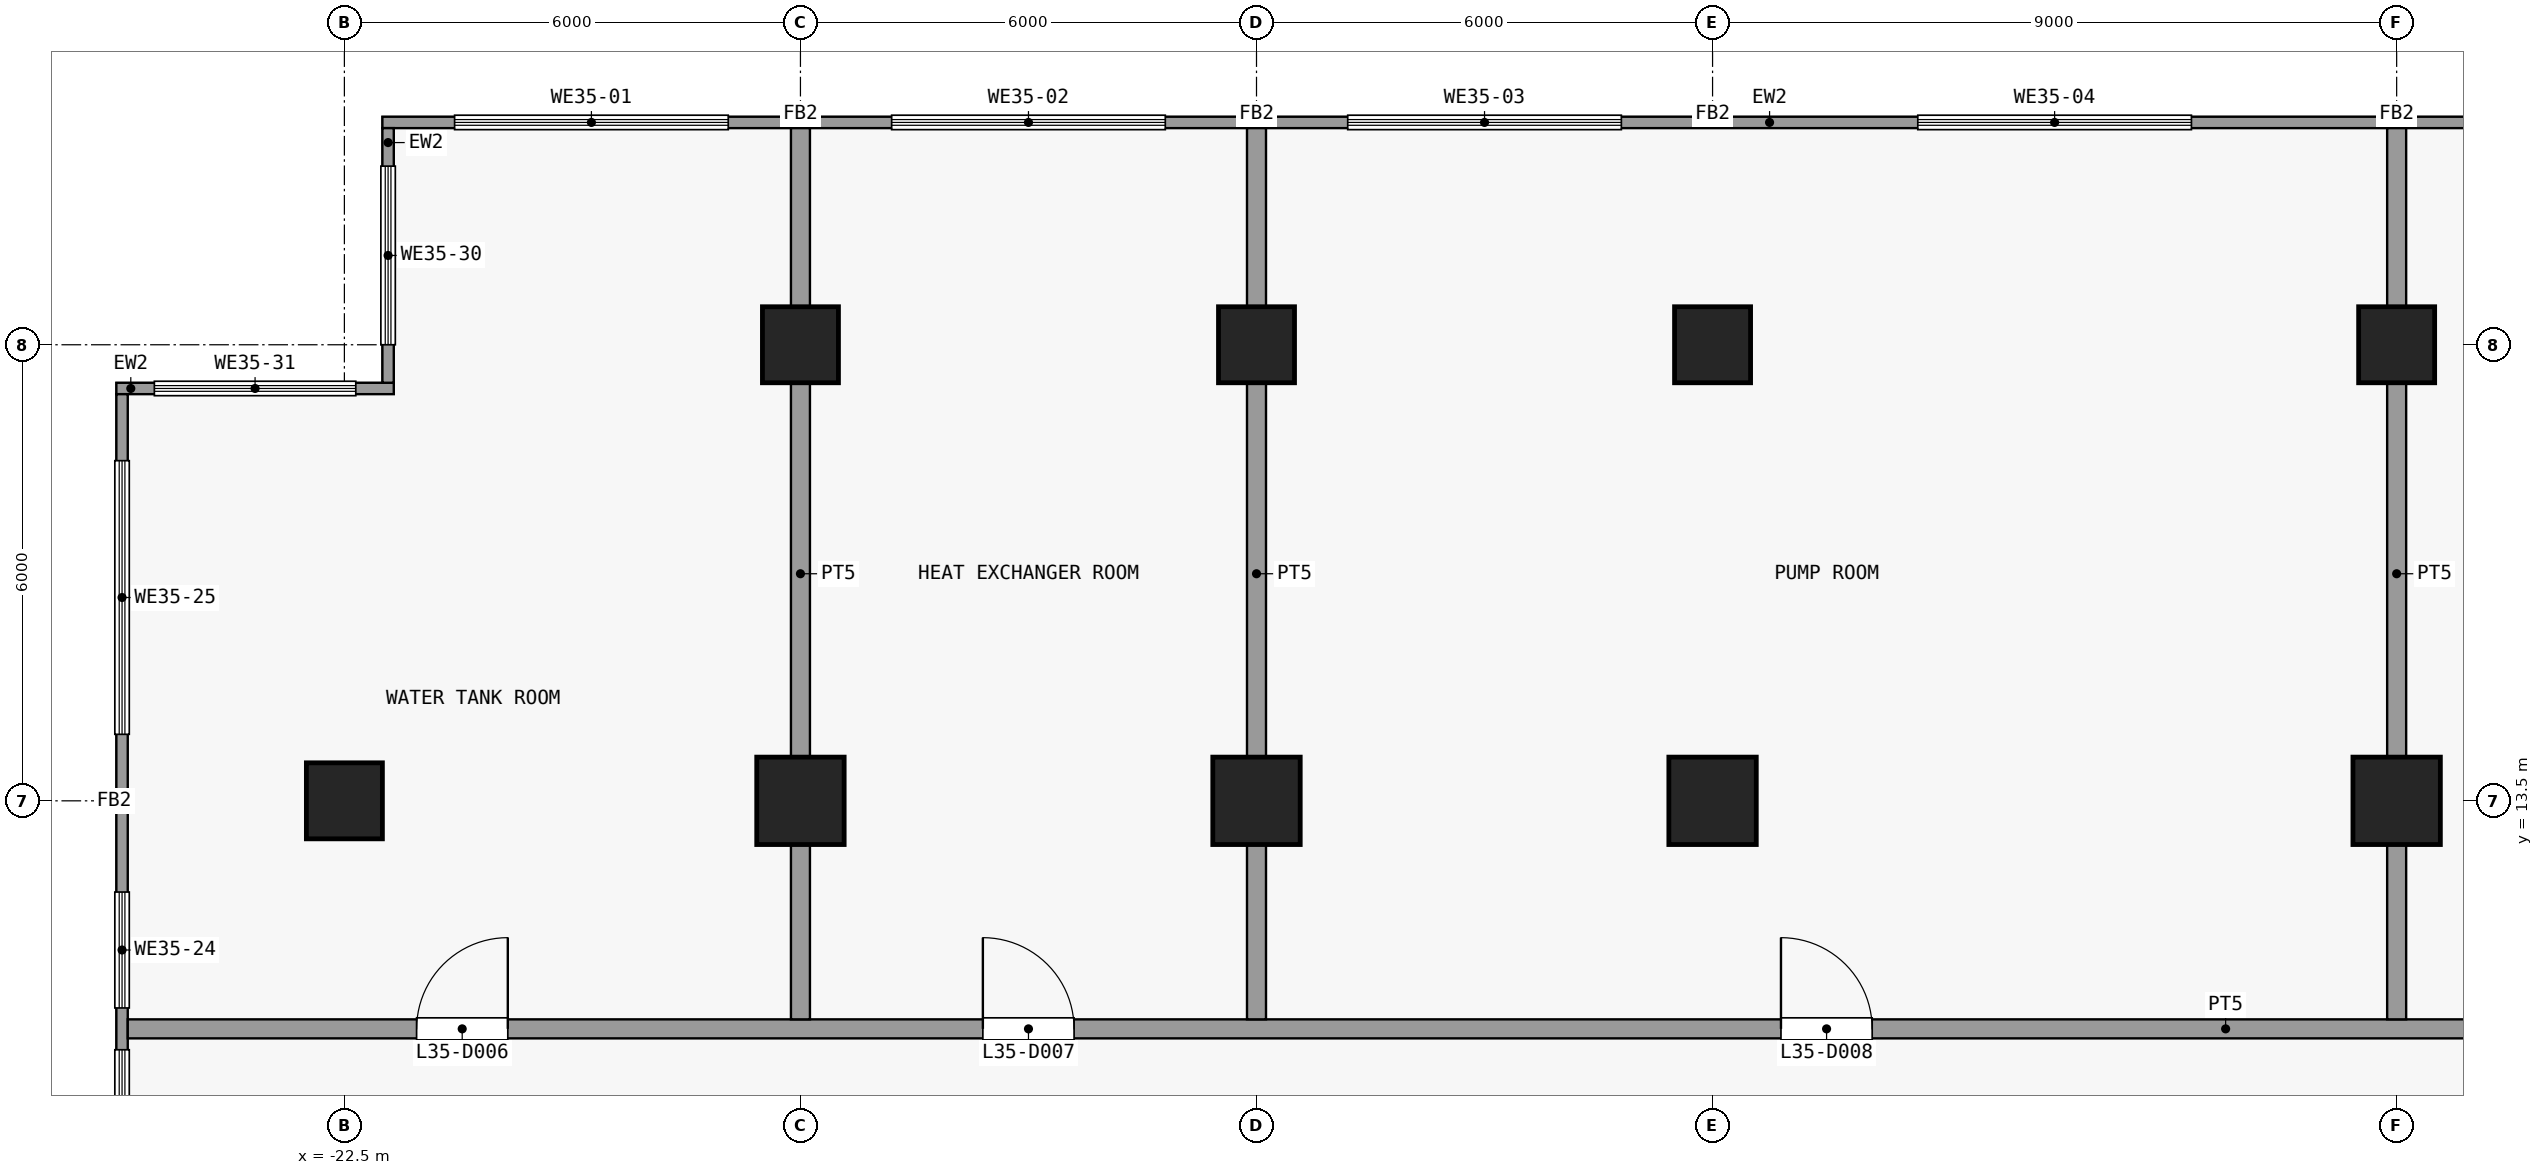
"""IFC4 building model, lengths in metres.
Left out: names, types, materials, properties, quantities, classifications, styles, units other than length and angle.
Written with IfcOpenShell. Run it as: python <this file> out.ifc"""

import sys

from ifc_helpers import new_model, si_unit, direction, frame, frame_2d, origin, origin_2d, place, context, subcontext, project, spatial, rectangle, extrude, element, fill, save


model = new_model("IFC4")
c1 = context("Model", 3, precision=1e-05, world=origin(), true_north=direction((0.0, 1.0)))
c2 = subcontext(c1, "Body", "Model", "MODEL_VIEW")
j1 = project(units=[si_unit("LENGTHUNIT", "METRE"), si_unit("PLANEANGLEUNIT", "RADIAN")], contexts=[c1])
p1 = place(None, origin())
s1 = spatial("IfcSite", under=j1, at=p1, CompositionType="ELEMENT")
p2 = place(p1, origin())
s2 = spatial("IfcBuilding", under=s1, at=p2, CompositionType="ELEMENT")
p3 = place(p2, frame((0.0, 0.0, 143.9)))
s3 = spatial("IfcBuildingStorey", under=s2, at=p3, CompositionType="ELEMENT", Elevation=143.9)
p4 = place(p3, frame((-22.5, 13.5, 0.0), z_axis=(0.0, 0.0, 1.0), x_axis=(1.0, 0.0, 0.0)))
e1 = element("IfcColumn", 1, at=p4, inside=s3, PredefinedType="COLUMN", context=c2, shape_type="SweptSolid", body=[
    extrude(rectangle(XDim=1.0, YDim=1.0, at=origin_2d()), origin(), (0.0, 0.0, 1.0), 5.4),
])
p5 = place(p3, frame((-16.5, 13.5, 0.0), z_axis=(0.0, 0.0, 1.0), x_axis=(1.0, 0.0, 0.0)))
e2 = element("IfcColumn", 2, at=p5, inside=s3, PredefinedType="COLUMN", context=c2, shape_type="SweptSolid", body=[
    extrude(rectangle(XDim=1.15, YDim=1.15, at=origin_2d()), origin(), (0.0, 0.0, 1.0), 5.4),
])
p6 = place(p3, frame((-16.5, 19.5, 0.0), z_axis=(0.0, 0.0, 1.0), x_axis=(1.0, 0.0, 0.0)))
e3 = element("IfcColumn", 3, at=p6, inside=s3, PredefinedType="COLUMN", context=c2, shape_type="SweptSolid", body=[
    extrude(rectangle(XDim=1.0, YDim=1.0, at=origin_2d()), origin(), (0.0, 0.0, 1.0), 5.4),
])
p7 = place(p3, frame((-10.5, 13.5, 0.0), z_axis=(0.0, 0.0, 1.0), x_axis=(1.0, 0.0, 0.0)))
e4 = element("IfcColumn", 4, at=p7, inside=s3, PredefinedType="COLUMN", context=c2, shape_type="SweptSolid", body=[
    extrude(rectangle(XDim=1.15, YDim=1.15, at=origin_2d()), origin(), (0.0, 0.0, 1.0), 5.4),
])
p8 = place(p3, frame((-10.5, 19.5, 0.0), z_axis=(0.0, 0.0, 1.0), x_axis=(1.0, 0.0, 0.0)))
e5 = element("IfcColumn", 5, at=p8, inside=s3, PredefinedType="COLUMN", context=c2, shape_type="SweptSolid", body=[
    extrude(rectangle(XDim=1.0, YDim=1.0, at=origin_2d()), origin(), (0.0, 0.0, 1.0), 5.4),
])
p9 = place(p3, frame((-4.5, 13.5, 0.0), z_axis=(0.0, 0.0, 1.0), x_axis=(1.0, 0.0, 0.0)))
e6 = element("IfcColumn", 6, at=p9, inside=s3, PredefinedType="COLUMN", context=c2, shape_type="SweptSolid", body=[
    extrude(rectangle(XDim=1.15, YDim=1.15, at=origin_2d()), origin(), (0.0, 0.0, 1.0), 5.4),
])
p10 = place(p3, frame((-4.5, 19.5, 0.0), z_axis=(0.0, 0.0, 1.0), x_axis=(1.0, 0.0, 0.0)))
e7 = element("IfcColumn", 7, at=p10, inside=s3, PredefinedType="COLUMN", context=c2, shape_type="SweptSolid", body=[
    extrude(rectangle(XDim=1.0, YDim=1.0, at=origin_2d()), origin(), (0.0, 0.0, 1.0), 5.4),
])
p11 = place(p3, frame((4.5, 13.5, 0.0), z_axis=(0.0, 0.0, 1.0), x_axis=(1.0, 0.0, 0.0)))
e8 = element("IfcColumn", 8, at=p11, inside=s3, PredefinedType="COLUMN", context=c2, shape_type="SweptSolid", body=[
    extrude(rectangle(XDim=1.15, YDim=1.15, at=origin_2d()), origin(), (0.0, 0.0, 1.0), 5.4),
])
p12 = place(p3, frame((4.5, 19.5, 0.0), z_axis=(0.0, 0.0, 1.0), x_axis=(1.0, 0.0, 0.0)))
e9 = element("IfcColumn", 9, at=p12, inside=s3, PredefinedType="COLUMN", context=c2, shape_type="SweptSolid", body=[
    extrude(rectangle(XDim=1.0, YDim=1.0, at=origin_2d()), origin(), (0.0, 0.0, 1.0), 5.4),
])
p13 = place(p3, frame((-22.0, 22.425, 0.0), z_axis=(0.0, 0.0, 1.0), x_axis=(1.0, 0.0, 0.0)))
e10 = element("IfcWall", 10, at=p13, inside=s3, PredefinedType="SOLIDWALL", context=c2, shape_type="SweptSolid", body=[
    extrude(rectangle(XDim=44.0, YDim=0.15, at=frame_2d((22.0, 0.0))), origin(), (0.0, 0.0, 1.0), 5.0),
])
p14 = place(p13, frame((0.95, 0.0, 1.2)))
e11 = element("IfcOpeningElement", 11, at=p14, cuts=e10, PredefinedType="OPENING", context=c2, shape_type="SweptSolid", body=[
    extrude(rectangle(XDim=3.6, YDim=3.0, at=frame_2d((1.8, 1.5))), frame((0.0, 0.085, 0.0), z_axis=(0.0, -1.0, 0.0), x_axis=(1.0, 0.0, 0.0)), (0.0, 0.0, 1.0), 0.17),
])
p15 = place(p13, frame((6.7, 0.0, 1.2)))
e12 = element("IfcOpeningElement", 12, at=p15, cuts=e10, PredefinedType="OPENING", context=c2, shape_type="SweptSolid", body=[
    extrude(rectangle(XDim=3.6, YDim=3.0, at=frame_2d((1.8, 1.5))), frame((0.0, 0.085, 0.0), z_axis=(0.0, -1.0, 0.0), x_axis=(1.0, 0.0, 0.0)), (0.0, 0.0, 1.0), 0.17),
])
p16 = place(p13, frame((12.7, 0.0, 1.2)))
e13 = element("IfcOpeningElement", 13, at=p16, cuts=e10, PredefinedType="OPENING", context=c2, shape_type="SweptSolid", body=[
    extrude(rectangle(XDim=3.6, YDim=3.0, at=frame_2d((1.8, 1.5))), frame((0.0, 0.085, 0.0), z_axis=(0.0, -1.0, 0.0), x_axis=(1.0, 0.0, 0.0)), (0.0, 0.0, 1.0), 0.17),
])
p17 = place(p13, frame((20.2, 0.0, 1.2)))
e14 = element("IfcOpeningElement", 14, at=p17, cuts=e10, PredefinedType="OPENING", context=c2, shape_type="SweptSolid", body=[
    extrude(rectangle(XDim=3.6, YDim=3.0, at=frame_2d((1.8, 1.5))), frame((0.0, 0.085, 0.0), z_axis=(0.0, -1.0, 0.0), x_axis=(1.0, 0.0, 0.0)), (0.0, 0.0, 1.0), 0.17),
])
p18 = place(p13, frame((27.7, 0.0, 1.2)))
e15 = element("IfcOpeningElement", 15, at=p18, cuts=e10, PredefinedType="OPENING", context=c2, shape_type="SweptSolid", body=[
    extrude(rectangle(XDim=3.6, YDim=3.0, at=frame_2d((1.8, 1.5))), frame((0.0, 0.085, 0.0), z_axis=(0.0, -1.0, 0.0), x_axis=(1.0, 0.0, 0.0)), (0.0, 0.0, 1.0), 0.17),
])
p19 = place(p13, frame((33.7, 0.0, 1.2)))
e16 = element("IfcOpeningElement", 16, at=p19, cuts=e10, PredefinedType="OPENING", context=c2, shape_type="SweptSolid", body=[
    extrude(rectangle(XDim=3.6, YDim=3.0, at=frame_2d((1.8, 1.5))), frame((0.0, 0.085, 0.0), z_axis=(0.0, -1.0, 0.0), x_axis=(1.0, 0.0, 0.0)), (0.0, 0.0, 1.0), 0.17),
])
p20 = place(p13, frame((39.45, 0.0, 1.2)))
e17 = element("IfcOpeningElement", 17, at=p20, cuts=e10, PredefinedType="OPENING", context=c2, shape_type="SweptSolid", body=[
    extrude(rectangle(XDim=3.6, YDim=3.0, at=frame_2d((1.8, 1.5))), frame((0.0, 0.085, 0.0), z_axis=(0.0, -1.0, 0.0), x_axis=(1.0, 0.0, 0.0)), (0.0, 0.0, 1.0), 0.17),
])
p21 = place(p3, frame((-25.425, -21.85, 0.0), z_axis=(0.0, 0.0, 1.0), x_axis=(0.0, 1.0, 0.0)))
e18 = element("IfcWall", 18, at=p21, inside=s3, PredefinedType="SOLIDWALL", context=c2, shape_type="SweptSolid", body=[
    extrude(rectangle(XDim=40.7, YDim=0.15, at=frame_2d((20.35, 0.0))), origin(), (0.0, 0.0, 1.0), 5.0),
])
p22 = place(p21, frame((2.375, 0.0, 1.2)))
e19 = element("IfcOpeningElement", 19, at=p22, cuts=e18, PredefinedType="OPENING", context=c2, shape_type="SweptSolid", body=[
    extrude(rectangle(XDim=3.6, YDim=3.0, at=frame_2d((1.8, 1.5))), frame((0.0, 0.085, 0.0), z_axis=(0.0, -1.0, 0.0), x_axis=(1.0, 0.0, 0.0)), (0.0, 0.0, 1.0), 0.17),
])
p23 = place(p21, frame((11.05, 0.0, 1.2)))
e20 = element("IfcOpeningElement", 20, at=p23, cuts=e18, PredefinedType="OPENING", context=c2, shape_type="SweptSolid", body=[
    extrude(rectangle(XDim=2.625, YDim=3.0, at=frame_2d((1.312, 1.5))), frame((0.0, 0.085, 0.0), z_axis=(0.0, -1.0, 0.0), x_axis=(1.0, 0.0, 0.0)), (0.0, 0.0, 1.0), 0.17),
])
p24 = place(p21, frame((18.55, 0.0, 1.2)))
e21 = element("IfcOpeningElement", 21, at=p24, cuts=e18, PredefinedType="OPENING", context=c2, shape_type="SweptSolid", body=[
    extrude(rectangle(XDim=3.6, YDim=3.0, at=frame_2d((1.8, 1.5))), frame((0.0, 0.085, 0.0), z_axis=(0.0, -1.0, 0.0), x_axis=(1.0, 0.0, 0.0)), (0.0, 0.0, 1.0), 0.17),
])
p25 = place(p21, frame((24.55, 0.0, 1.2)))
e22 = element("IfcOpeningElement", 22, at=p25, cuts=e18, PredefinedType="OPENING", context=c2, shape_type="SweptSolid", body=[
    extrude(rectangle(XDim=3.6, YDim=3.0, at=frame_2d((1.8, 1.5))), frame((0.0, 0.085, 0.0), z_axis=(0.0, -1.0, 0.0), x_axis=(1.0, 0.0, 0.0)), (0.0, 0.0, 1.0), 0.17),
])
p26 = place(p21, frame((30.55, 0.0, 1.2)))
e23 = element("IfcOpeningElement", 23, at=p26, cuts=e18, PredefinedType="OPENING", context=c2, shape_type="SweptSolid", body=[
    extrude(rectangle(XDim=1.525, YDim=3.0, at=frame_2d((0.762, 1.5))), frame((0.0, 0.085, 0.0), z_axis=(0.0, -1.0, 0.0), x_axis=(1.0, 0.0, 0.0)), (0.0, 0.0, 1.0), 0.17),
])
p27 = place(p21, frame((32.625, 0.0, 1.2)))
e24 = element("IfcOpeningElement", 24, at=p27, cuts=e18, PredefinedType="OPENING", context=c2, shape_type="SweptSolid", body=[
    extrude(rectangle(XDim=1.525, YDim=3.0, at=frame_2d((0.762, 1.5))), frame((0.0, 0.085, 0.0), z_axis=(0.0, -1.0, 0.0), x_axis=(1.0, 0.0, 0.0)), (0.0, 0.0, 1.0), 0.17),
])
p28 = place(p21, frame((36.225, 0.0, 1.2)))
e25 = element("IfcOpeningElement", 25, at=p28, cuts=e18, PredefinedType="OPENING", context=c2, shape_type="SweptSolid", body=[
    extrude(rectangle(XDim=3.6, YDim=3.0, at=frame_2d((1.8, 1.5))), frame((0.0, 0.085, 0.0), z_axis=(0.0, -1.0, 0.0), x_axis=(1.0, 0.0, 0.0)), (0.0, 0.0, 1.0), 0.17),
])
p29 = place(p3, frame((-21.925, 19.0, 0.0), z_axis=(0.0, 0.0, 1.0), x_axis=(0.0, 1.0, 0.0)))
e26 = element("IfcWall", 26, at=p29, inside=s3, PredefinedType="SOLIDWALL", context=c2, shape_type="SweptSolid", body=[
    extrude(rectangle(XDim=3.35, YDim=0.15, at=frame_2d((1.675, 0.0))), origin(), (0.0, 0.0, 1.0), 5.0),
])
p30 = place(p29, frame((0.5, 0.0, 1.2)))
e27 = element("IfcOpeningElement", 27, at=p30, cuts=e26, PredefinedType="OPENING", context=c2, shape_type="SweptSolid", body=[
    extrude(rectangle(XDim=2.35, YDim=3.0, at=frame_2d((1.175, 1.5))), frame((0.0, 0.085, 0.0), z_axis=(0.0, -1.0, 0.0), x_axis=(1.0, 0.0, 0.0)), (0.0, 0.0, 1.0), 0.17),
])
p31 = place(p3, frame((-25.5, 18.925, 0.0), z_axis=(0.0, 0.0, 1.0), x_axis=(1.0, 0.0, 0.0)))
e28 = element("IfcWall", 28, at=p31, inside=s3, PredefinedType="SOLIDWALL", context=c2, shape_type="SweptSolid", body=[
    extrude(rectangle(XDim=3.65, YDim=0.15, at=frame_2d((1.825, 0.0))), origin(), (0.0, 0.0, 1.0), 5.0),
])
p32 = place(p31, frame((0.5, 0.0, 1.2)))
e29 = element("IfcOpeningElement", 29, at=p32, cuts=e28, PredefinedType="OPENING", context=c2, shape_type="SweptSolid", body=[
    extrude(rectangle(XDim=2.65, YDim=3.0, at=frame_2d((1.325, 1.5))), frame((0.0, 0.085, 0.0), z_axis=(0.0, -1.0, 0.0), x_axis=(1.0, 0.0, 0.0)), (0.0, 0.0, 1.0), 0.17),
])
p33 = place(p3, frame((-25.35, 10.5, 0.0), z_axis=(0.0, 0.0, 1.0), x_axis=(1.0, 0.0, 0.0)))
e30 = element("IfcWall", 30, at=p33, inside=s3, PredefinedType="PARTITIONING", context=c2, shape_type="SweptSolid", body=[
    extrude(rectangle(XDim=50.7, YDim=0.25, at=frame_2d((25.35, 0.0))), origin(), (0.0, 0.0, 1.0), 5.0),
])
p34 = place(p33, frame((3.8, 0.0, 0.0)))
e31 = element("IfcOpeningElement", 31, at=p34, cuts=e30, PredefinedType="OPENING", context=c2, shape_type="SweptSolid", body=[
    extrude(rectangle(XDim=1.2, YDim=2.1, at=frame_2d((0.6, 1.05))), frame((0.0, 0.135, 0.0), z_axis=(0.0, -1.0, 0.0), x_axis=(1.0, 0.0, 0.0)), (0.0, 0.0, 1.0), 0.27),
])
p35 = place(p33, frame((11.25, 0.0, 0.0)))
e32 = element("IfcOpeningElement", 32, at=p35, cuts=e30, PredefinedType="OPENING", context=c2, shape_type="SweptSolid", body=[
    extrude(rectangle(XDim=1.2, YDim=2.1, at=frame_2d((0.6, 1.05))), frame((0.0, 0.135, 0.0), z_axis=(0.0, -1.0, 0.0), x_axis=(1.0, 0.0, 0.0)), (0.0, 0.0, 1.0), 0.27),
])
p36 = place(p33, frame((21.75, 0.0, 0.0)))
e33 = element("IfcOpeningElement", 33, at=p36, cuts=e30, PredefinedType="OPENING", context=c2, shape_type="SweptSolid", body=[
    extrude(rectangle(XDim=1.2, YDim=2.1, at=frame_2d((0.6, 1.05))), frame((0.0, 0.135, 0.0), z_axis=(0.0, -1.0, 0.0), x_axis=(1.0, 0.0, 0.0)), (0.0, 0.0, 1.0), 0.27),
])
p37 = place(p33, frame((32.25, 0.0, 0.0)))
e34 = element("IfcOpeningElement", 34, at=p37, cuts=e30, PredefinedType="OPENING", context=c2, shape_type="SweptSolid", body=[
    extrude(rectangle(XDim=1.2, YDim=2.1, at=frame_2d((0.6, 1.05))), frame((0.0, 0.135, 0.0), z_axis=(0.0, -1.0, 0.0), x_axis=(1.0, 0.0, 0.0)), (0.0, 0.0, 1.0), 0.27),
])
p38 = place(p33, frame((38.25, 0.0, 0.0)))
e35 = element("IfcOpeningElement", 35, at=p38, cuts=e30, PredefinedType="OPENING", context=c2, shape_type="SweptSolid", body=[
    extrude(rectangle(XDim=1.2, YDim=2.1, at=frame_2d((0.6, 1.05))), frame((0.0, 0.135, 0.0), z_axis=(0.0, -1.0, 0.0), x_axis=(1.0, 0.0, 0.0)), (0.0, 0.0, 1.0), 0.27),
])
p39 = place(p33, frame((45.65, 0.0, 0.0)))
e36 = element("IfcOpeningElement", 36, at=p39, cuts=e30, PredefinedType="OPENING", context=c2, shape_type="SweptSolid", body=[
    extrude(rectangle(XDim=1.2, YDim=2.1, at=frame_2d((0.6, 1.05))), frame((0.0, 0.135, 0.0), z_axis=(0.0, -1.0, 0.0), x_axis=(1.0, 0.0, 0.0)), (0.0, 0.0, 1.0), 0.27),
])
for number, where, z_axis, x_axis in (
    (37, (-16.5, 10.625, 0.0), (0.0, 0.0, 1.0), (0.0, 1.0, 0.0)),
    (38, (-10.5, 10.625, 0.0), (0.0, 0.0, 1.0), (0.0, 1.0, 0.0)),
    (39, (4.5, 10.625, 0.0), (0.0, 0.0, 1.0), (0.0, 1.0, 0.0)),
):
    element("IfcWall", number, at=place(p3, frame(where, z_axis=z_axis, x_axis=x_axis)), inside=s3, PredefinedType="PARTITIONING", context=c2, shape_type="SweptSolid", body=[
        extrude(rectangle(XDim=11.725, YDim=0.25, at=frame_2d((5.863, 0.0))), origin(), (0.0, 0.0, 1.0), 5.0),
    ])
p40 = place(p14, origin())
e40 = element("IfcWindow", 40, at=p40, inside=s3, PartitioningType="SINGLE_PANEL", PredefinedType="WINDOW", context=c2, shape_type="SweptSolid", body=[
    extrude(rectangle(XDim=3.6, YDim=3.0, at=frame_2d((1.8, 1.5))), frame((0.0, 0.03, 0.0), z_axis=(0.0, -1.0, 0.0), x_axis=(1.0, 0.0, 0.0)), (0.0, 0.0, 1.0), 0.06),
])
fill(e11, e40)
p41 = place(p15, origin())
e41 = element("IfcWindow", 41, at=p41, inside=s3, PartitioningType="SINGLE_PANEL", PredefinedType="WINDOW", context=c2, shape_type="SweptSolid", body=[
    extrude(rectangle(XDim=3.6, YDim=3.0, at=frame_2d((1.8, 1.5))), frame((0.0, 0.03, 0.0), z_axis=(0.0, -1.0, 0.0), x_axis=(1.0, 0.0, 0.0)), (0.0, 0.0, 1.0), 0.06),
])
fill(e12, e41)
p42 = place(p16, origin())
e42 = element("IfcWindow", 42, at=p42, inside=s3, PartitioningType="SINGLE_PANEL", PredefinedType="WINDOW", context=c2, shape_type="SweptSolid", body=[
    extrude(rectangle(XDim=3.6, YDim=3.0, at=frame_2d((1.8, 1.5))), frame((0.0, 0.03, 0.0), z_axis=(0.0, -1.0, 0.0), x_axis=(1.0, 0.0, 0.0)), (0.0, 0.0, 1.0), 0.06),
])
fill(e13, e42)
p43 = place(p17, origin())
e43 = element("IfcWindow", 43, at=p43, inside=s3, PartitioningType="SINGLE_PANEL", PredefinedType="WINDOW", context=c2, shape_type="SweptSolid", body=[
    extrude(rectangle(XDim=3.6, YDim=3.0, at=frame_2d((1.8, 1.5))), frame((0.0, 0.03, 0.0), z_axis=(0.0, -1.0, 0.0), x_axis=(1.0, 0.0, 0.0)), (0.0, 0.0, 1.0), 0.06),
])
fill(e14, e43)
p44 = place(p26, origin())
e44 = element("IfcWindow", 44, at=p44, inside=s3, PartitioningType="SINGLE_PANEL", PredefinedType="WINDOW", context=c2, shape_type="SweptSolid", body=[
    extrude(rectangle(XDim=1.525, YDim=3.0, at=frame_2d((0.762, 1.5))), frame((0.0, 0.03, 0.0), z_axis=(0.0, -1.0, 0.0), x_axis=(1.0, 0.0, 0.0)), (0.0, 0.0, 1.0), 0.06),
])
fill(e23, e44)
p45 = place(p27, origin())
e45 = element("IfcWindow", 45, at=p45, inside=s3, PartitioningType="SINGLE_PANEL", PredefinedType="WINDOW", context=c2, shape_type="SweptSolid", body=[
    extrude(rectangle(XDim=1.525, YDim=3.0, at=frame_2d((0.762, 1.5))), frame((0.0, 0.03, 0.0), z_axis=(0.0, -1.0, 0.0), x_axis=(1.0, 0.0, 0.0)), (0.0, 0.0, 1.0), 0.06),
])
fill(e24, e45)
p46 = place(p28, origin())
e46 = element("IfcWindow", 46, at=p46, inside=s3, PartitioningType="SINGLE_PANEL", PredefinedType="WINDOW", context=c2, shape_type="SweptSolid", body=[
    extrude(rectangle(XDim=3.6, YDim=3.0, at=frame_2d((1.8, 1.5))), frame((0.0, 0.03, 0.0), z_axis=(0.0, -1.0, 0.0), x_axis=(1.0, 0.0, 0.0)), (0.0, 0.0, 1.0), 0.06),
])
fill(e25, e46)
p47 = place(p30, origin())
e47 = element("IfcWindow", 47, at=p47, inside=s3, PartitioningType="SINGLE_PANEL", PredefinedType="WINDOW", context=c2, shape_type="SweptSolid", body=[
    extrude(rectangle(XDim=2.35, YDim=3.0, at=frame_2d((1.175, 1.5))), frame((0.0, 0.03, 0.0), z_axis=(0.0, -1.0, 0.0), x_axis=(1.0, 0.0, 0.0)), (0.0, 0.0, 1.0), 0.06),
])
fill(e27, e47)
p48 = place(p32, origin())
e48 = element("IfcWindow", 48, at=p48, inside=s3, PartitioningType="SINGLE_PANEL", PredefinedType="WINDOW", context=c2, shape_type="SweptSolid", body=[
    extrude(rectangle(XDim=2.65, YDim=3.0, at=frame_2d((1.325, 1.5))), frame((0.0, 0.03, 0.0), z_axis=(0.0, -1.0, 0.0), x_axis=(1.0, 0.0, 0.0)), (0.0, 0.0, 1.0), 0.06),
])
fill(e29, e48)
p49 = place(p34, origin())
e49 = element("IfcDoor", 49, at=p49, inside=s3, OperationType="SINGLE_SWING_LEFT", PredefinedType="DOOR", context=c2, shape_type="SweptSolid", body=[
    extrude(rectangle(XDim=1.2, YDim=2.1, at=frame_2d((0.6, 1.05))), frame((0.0, 0.025, 0.0), z_axis=(0.0, -1.0, 0.0), x_axis=(1.0, 0.0, 0.0)), (0.0, 0.0, 1.0), 0.05),
])
fill(e31, e49)
p50 = place(p35, origin())
e50 = element("IfcDoor", 50, at=p50, inside=s3, OperationType="SINGLE_SWING_RIGHT", PredefinedType="DOOR", context=c2, shape_type="SweptSolid", body=[
    extrude(rectangle(XDim=1.2, YDim=2.1, at=frame_2d((0.6, 1.05))), frame((0.0, 0.025, 0.0), z_axis=(0.0, -1.0, 0.0), x_axis=(1.0, 0.0, 0.0)), (0.0, 0.0, 1.0), 0.05),
])
fill(e32, e50)
p51 = place(p36, origin())
e51 = element("IfcDoor", 51, at=p51, inside=s3, OperationType="SINGLE_SWING_RIGHT", PredefinedType="DOOR", context=c2, shape_type="SweptSolid", body=[
    extrude(rectangle(XDim=1.2, YDim=2.1, at=frame_2d((0.6, 1.05))), frame((0.0, 0.025, 0.0), z_axis=(0.0, -1.0, 0.0), x_axis=(1.0, 0.0, 0.0)), (0.0, 0.0, 1.0), 0.05),
])
fill(e33, e51)
save(model, sys.argv[1])
